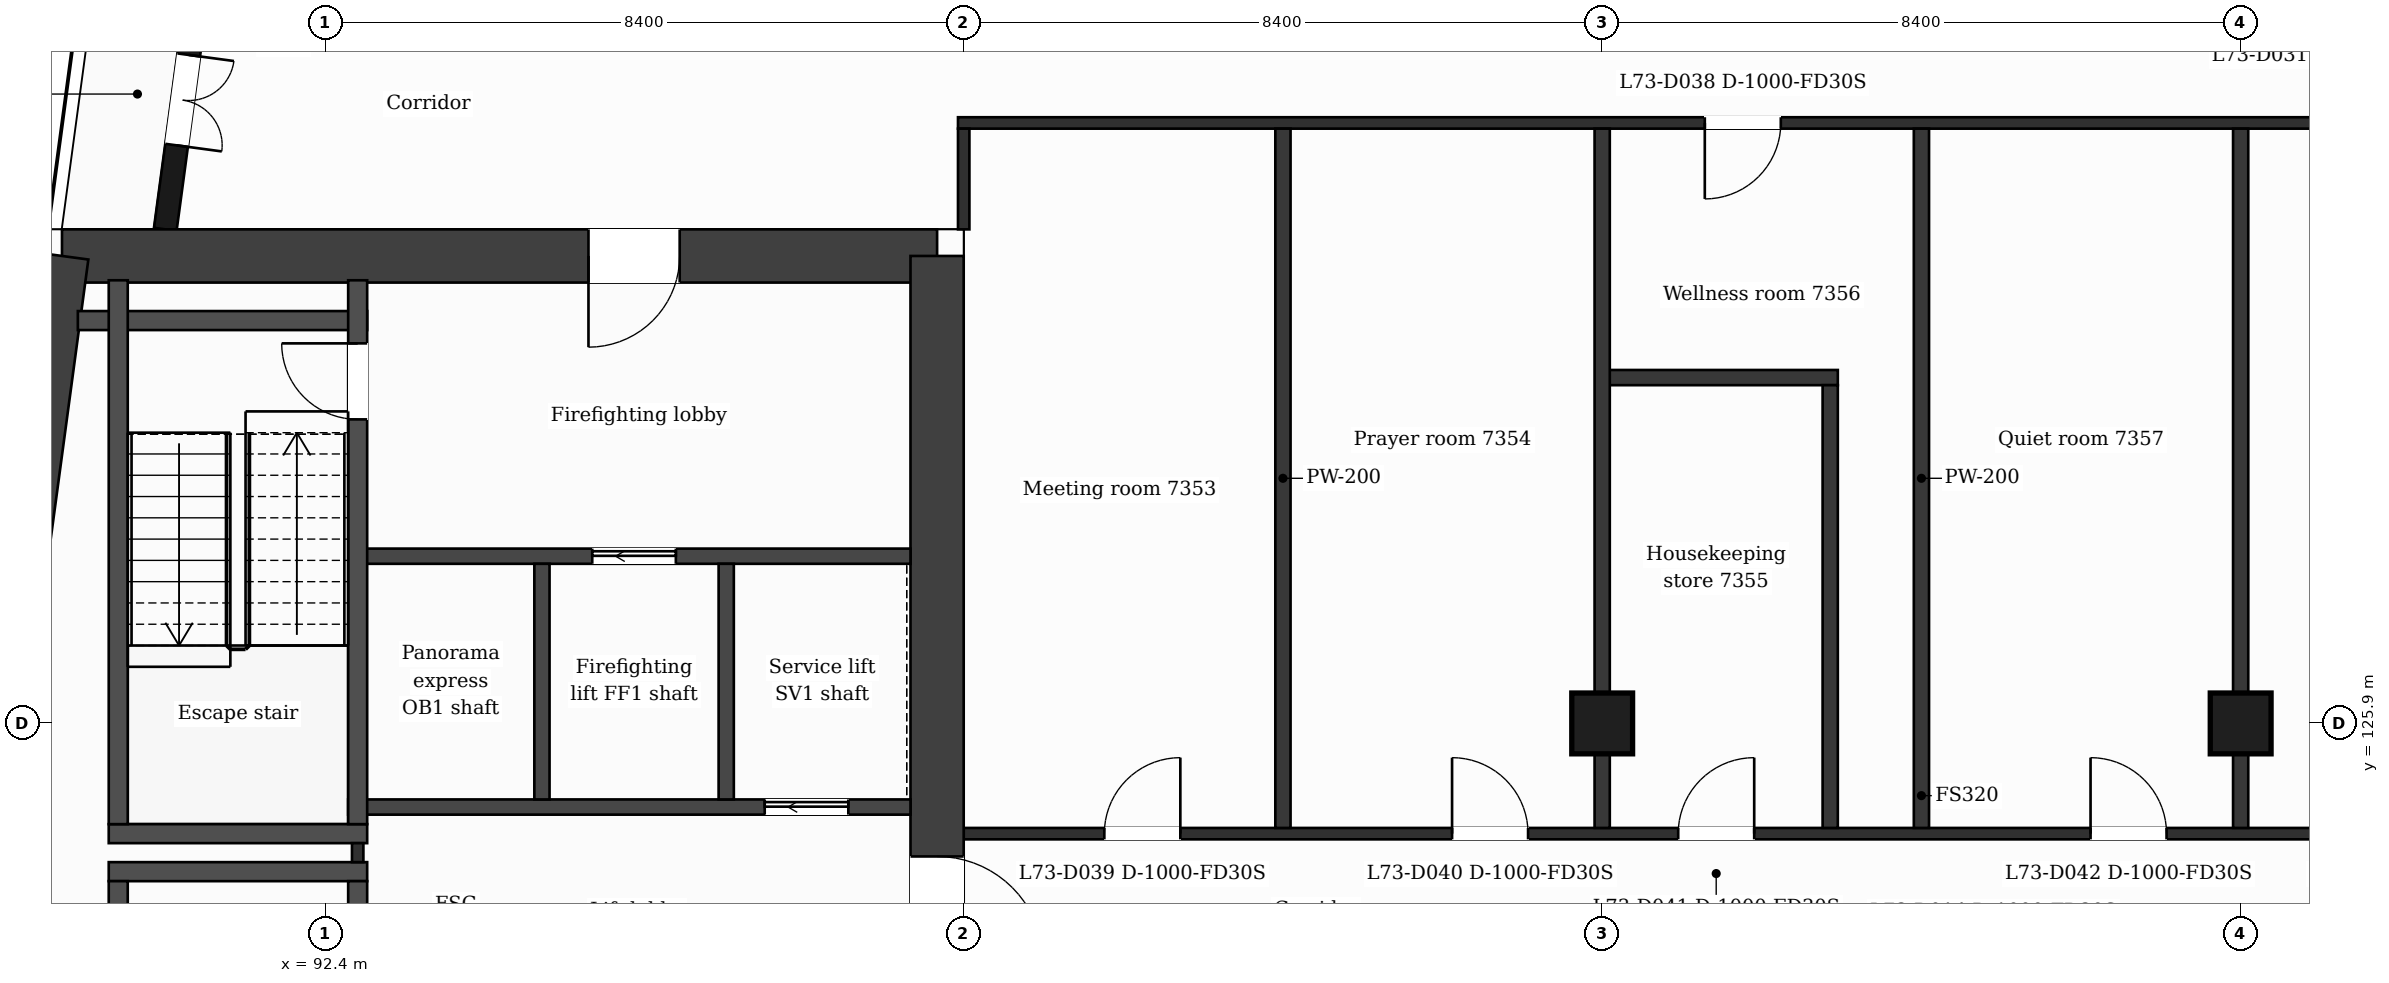
"""IFC4 building model, lengths in metres.
Left out: names, types, materials, properties, quantities, classifications, styles, units other than length and angle.
Written with IfcOpenShell. Run it as: python <this file> out.ifc"""

import sys

from ifc_helpers import new_model, si_unit, direction, frame, frame_2d, origin, origin_2d, place, context, subcontext, project, spatial, rectangle, extrude, element, fill, save


model = new_model("IFC4")
c1 = context("Model", 3, precision=1e-05, world=origin(), true_north=direction((0.0, 1.0)))
c2 = subcontext(c1, "Body", "Model", "MODEL_VIEW")
j1 = project(units=[si_unit("LENGTHUNIT", "METRE"), si_unit("PLANEANGLEUNIT", "RADIAN")], contexts=[c1])
p1 = place(None, origin())
s1 = spatial("IfcSite", under=j1, at=p1, CompositionType="ELEMENT")
p2 = place(p1, origin())
s2 = spatial("IfcBuilding", under=s1, at=p2, CompositionType="ELEMENT")
p3 = place(p2, frame((0.0, 0.0, 299.7)))
s3 = spatial("IfcBuildingStorey", under=s2, at=p3, CompositionType="ELEMENT", Elevation=299.7)
p4 = place(p3, frame((88.937, 132.05, 0.0), z_axis=(0.0, 0.0, 1.0), x_axis=(1.0, 0.0, 0.0)))
e1 = element("IfcWall", 1, at=p4, inside=s3, PredefinedType="SHEAR", context=c2, shape_type="SweptSolid", body=[
    extrude(rectangle(XDim=11.513, YDim=0.7, at=frame_2d((5.757, 0.0))), origin(), (0.0, 0.0, 1.0), 3.7),
])
p5 = place(p4, frame((6.927, 0.0, 0.0)))
e2 = element("IfcOpeningElement", 2, at=p5, cuts=e1, PredefinedType="OPENING", context=c2, shape_type="SweptSolid", body=[
    extrude(rectangle(XDim=1.2, YDim=2.1, at=frame_2d((0.6, 1.05))), frame((0.0, 0.36, 0.0), z_axis=(0.0, -1.0, 0.0), x_axis=(1.0, 0.0, 0.0)), (0.0, 0.0, 1.0), 0.72),
])
p6 = place(p3, frame((100.45, 132.05, 0.0), z_axis=(0.0, 0.0, 1.0), x_axis=(0.0, -1.0, 0.0)))
e3 = element("IfcWall", 3, at=p6, inside=s3, PredefinedType="SHEAR", context=c2, shape_type="SweptSolid", body=[
    extrude(rectangle(XDim=15.7, YDim=0.7, at=frame_2d((7.85, 0.0))), origin(), (0.0, 0.0, 1.0), 3.7),
])
p7 = place(p6, frame((7.9, 0.0, 0.0)))
e4 = element("IfcOpeningElement", 4, at=p7, cuts=e3, PredefinedType="OPENING", context=c2, shape_type="SweptSolid", body=[
    extrude(rectangle(XDim=1.4, YDim=2.1, at=frame_2d((0.7, 1.05))), frame((0.0, 0.36, 0.0), z_axis=(0.0, -1.0, 0.0), x_axis=(1.0, 0.0, 0.0)), (0.0, 0.0, 1.0), 0.72),
])
p8 = place(p3, frame((86.823, 116.35, 0.0), z_axis=(0.0, 0.0, 1.0), x_axis=(0.133416378607, 0.99106007382, 0.0)))
e5 = element("IfcWall", 5, at=p8, inside=s3, PredefinedType="SHEAR", context=c2, shape_type="SweptSolid", body=[
    extrude(rectangle(XDim=15.842, YDim=0.7, at=frame_2d((7.921, 0.0))), origin(), (0.0, 0.0, 1.0), 3.7),
])
for number, where, z_axis, x_axis in (
    (6, (109.2, 125.9, 0.0), (0.0, 0.0, 1.0), (1.0, 0.0, 0.0)),
    (7, (117.6, 125.9, 0.0), (0.0, 0.0, 1.0), (1.0, 0.0, 0.0)),
):
    element("IfcColumn", number, at=place(p3, frame(where, z_axis=z_axis, x_axis=x_axis)), inside=s3, PredefinedType="COLUMN", context=c2, shape_type="SweptSolid", body=[
        extrude(rectangle(XDim=0.8, YDim=0.8, at=origin_2d()), origin(), (0.0, 0.0, 1.0), 3.7),
    ])
p9 = place(p3, frame((91.177, 138.95, 0.0), z_axis=(0.0, 0.0, 1.0), x_axis=(-0.133426664613, -0.991058689065, 0.0)))
e8 = element("IfcWall", 8, at=p9, inside=s3, PredefinedType="SOLIDWALL", context=c2, shape_type="SweptSolid", body=[
    extrude(rectangle(XDim=6.609, YDim=0.3, at=frame_2d((3.305, 0.0))), origin(), (0.0, 0.0, 1.0), 3.25),
])
p10 = place(p9, frame((1.039, 0.0, 0.9)))
e9 = element("IfcOpeningElement", 9, at=p10, cuts=e8, PredefinedType="OPENING", context=c2, shape_type="SweptSolid", body=[
    extrude(rectangle(XDim=1.2, YDim=2.1, at=frame_2d((0.6, 1.05))), frame((0.0, 0.16, 0.0), z_axis=(0.0, -1.0, 0.0), x_axis=(1.0, 0.0, 0.0)), (0.0, 0.0, 1.0), 0.32),
])
p11 = place(p9, frame((4.294, 0.0, 0.0)))
e10 = element("IfcOpeningElement", 10, at=p11, cuts=e8, PredefinedType="OPENING", context=c2, shape_type="SweptSolid", body=[
    extrude(rectangle(XDim=1.2, YDim=2.4, at=frame_2d((0.6, 1.2))), frame((0.0, 0.16, 0.0), z_axis=(0.0, -1.0, 0.0), x_axis=(1.0, 0.0, 0.0)), (0.0, 0.0, 1.0), 0.32),
])
for number, where, z_axis, x_axis in (
    (11, (89.552, 123.95, 0.0), (0.0, 0.0, 1.0), (1.0, 0.0, 0.0)),
    (12, (89.552, 124.45, 0.0), (0.0, 0.0, 1.0), (1.0, 0.0, 0.0)),
):
    element("IfcWall", number, at=place(p3, frame(where, z_axis=z_axis, x_axis=x_axis)), inside=s3, PredefinedType="PARTITIONING", context=c2, shape_type="SweptSolid", body=[
        extrude(rectangle(XDim=3.4, YDim=0.25, at=frame_2d((1.7, 0.0))), origin(), (0.0, 0.0, 1.0), 3.25),
    ])
p12 = place(p3, frame((100.8, 124.45, 0.0), z_axis=(0.0, 0.0, 1.0), x_axis=(1.0, 0.0, 0.0)))
e13 = element("IfcWall", 13, at=p12, inside=s3, PredefinedType="PARTITIONING", context=c2, shape_type="SweptSolid", body=[
    extrude(rectangle(XDim=25.2, YDim=0.15, at=frame_2d((12.6, 0.0))), origin(), (0.0, 0.0, 1.0), 3.25),
])
p13 = place(p12, frame((1.85, 0.0, 0.0)))
e14 = element("IfcOpeningElement", 14, at=p13, cuts=e13, PredefinedType="OPENING", context=c2, shape_type="SweptSolid", body=[
    extrude(rectangle(XDim=1.0, YDim=2.1, at=frame_2d((0.5, 1.05))), frame((0.0, 0.085, 0.0), z_axis=(0.0, -1.0, 0.0), x_axis=(1.0, 0.0, 0.0)), (0.0, 0.0, 1.0), 0.17),
])
p14 = place(p12, frame((6.425, 0.0, 0.0)))
e15 = element("IfcOpeningElement", 15, at=p14, cuts=e13, PredefinedType="OPENING", context=c2, shape_type="SweptSolid", body=[
    extrude(rectangle(XDim=1.0, YDim=2.1, at=frame_2d((0.5, 1.05))), frame((0.0, 0.085, 0.0), z_axis=(0.0, -1.0, 0.0), x_axis=(1.0, 0.0, 0.0)), (0.0, 0.0, 1.0), 0.17),
])
p15 = place(p12, frame((9.4, 0.0, 0.0)))
e16 = element("IfcOpeningElement", 16, at=p15, cuts=e13, PredefinedType="OPENING", context=c2, shape_type="SweptSolid", body=[
    extrude(rectangle(XDim=1.0, YDim=2.1, at=frame_2d((0.5, 1.05))), frame((0.0, 0.085, 0.0), z_axis=(0.0, -1.0, 0.0), x_axis=(1.0, 0.0, 0.0)), (0.0, 0.0, 1.0), 0.17),
])
p16 = place(p12, frame((14.825, 0.0, 0.0)))
e17 = element("IfcOpeningElement", 17, at=p16, cuts=e13, PredefinedType="OPENING", context=c2, shape_type="SweptSolid", body=[
    extrude(rectangle(XDim=1.0, YDim=2.1, at=frame_2d((0.5, 1.05))), frame((0.0, 0.085, 0.0), z_axis=(0.0, -1.0, 0.0), x_axis=(1.0, 0.0, 0.0)), (0.0, 0.0, 1.0), 0.17),
])
p17 = place(p12, frame((18.825, 0.0, 0.0)))
e18 = element("IfcOpeningElement", 18, at=p17, cuts=e13, PredefinedType="OPENING", context=c2, shape_type="SweptSolid", body=[
    extrude(rectangle(XDim=1.0, YDim=2.1, at=frame_2d((0.5, 1.05))), frame((0.0, 0.085, 0.0), z_axis=(0.0, -1.0, 0.0), x_axis=(1.0, 0.0, 0.0)), (0.0, 0.0, 1.0), 0.17),
])
p18 = place(p3, frame((92.702, 124.8, 0.0), z_axis=(0.0, 0.0, 1.0), x_axis=(1.0, 0.0, 0.0)))
e19 = element("IfcWall", 19, at=p18, inside=s3, PredefinedType="PARTITIONING", context=c2, shape_type="SweptSolid", body=[
    extrude(rectangle(XDim=7.398, YDim=0.2, at=frame_2d((3.699, 0.0))), origin(), (0.0, 0.0, 1.0), 3.25),
])
p19 = place(p18, frame((5.48, 0.0, 0.0)))
e20 = element("IfcOpeningElement", 20, at=p19, cuts=e19, PredefinedType="OPENING", context=c2, shape_type="SweptSolid", body=[
    extrude(rectangle(XDim=1.1, YDim=2.1, at=frame_2d((0.55, 1.05))), frame((0.0, 0.11, 0.0), z_axis=(0.0, -1.0, 0.0), x_axis=(1.0, 0.0, 0.0)), (0.0, 0.0, 1.0), 0.22),
])
p20 = place(p3, frame((92.827, 128.1, 0.0), z_axis=(0.0, 0.0, 1.0), x_axis=(1.0, 0.0, 0.0)))
e21 = element("IfcWall", 21, at=p20, inside=s3, PredefinedType="PARTITIONING", context=c2, shape_type="SweptSolid", body=[
    extrude(rectangle(XDim=7.273, YDim=0.2, at=frame_2d((3.637, 0.0))), origin(), (0.0, 0.0, 1.0), 3.25),
])
p21 = place(p20, frame((3.086, 0.0, 0.0)))
e22 = element("IfcOpeningElement", 22, at=p21, cuts=e21, PredefinedType="OPENING", context=c2, shape_type="SweptSolid", body=[
    extrude(rectangle(XDim=1.1, YDim=2.1, at=frame_2d((0.55, 1.05))), frame((0.0, 0.11, 0.0), z_axis=(0.0, -1.0, 0.0), x_axis=(1.0, 0.0, 0.0)), (0.0, 0.0, 1.0), 0.22),
])
p22 = place(p3, frame((109.2, 130.45, 0.0), z_axis=(0.0, 0.0, 1.0), x_axis=(1.0, 0.0, 0.0)))
e23 = element("IfcWall", 23, at=p22, inside=s3, PredefinedType="PARTITIONING", context=c2, shape_type="SweptSolid", body=[
    extrude(rectangle(XDim=3.1, YDim=0.2, at=frame_2d((1.55, 0.0))), origin(), (0.0, 0.0, 1.0), 3.25),
])
p23 = place(p3, frame((89.146, 131.2, 0.0), z_axis=(0.0, 0.0, 1.0), x_axis=(1.0, 0.0, 0.0)))
e24 = element("IfcWall", 24, at=p23, inside=s3, PredefinedType="PARTITIONING", context=c2, shape_type="SweptSolid", body=[
    extrude(rectangle(XDim=3.806, YDim=0.25, at=frame_2d((1.903, 0.0))), origin(), (0.0, 0.0, 1.0), 3.25),
])
p24 = place(p3, frame((100.725, 133.8, 0.0), z_axis=(0.0, 0.0, 1.0), x_axis=(1.0, 0.0, 0.0)))
e25 = element("IfcWall", 25, at=p24, inside=s3, PredefinedType="PARTITIONING", context=c2, shape_type="SweptSolid", body=[
    extrude(rectangle(XDim=25.35, YDim=0.15, at=frame_2d((12.675, 0.0))), origin(), (0.0, 0.0, 1.0), 3.25),
])
p25 = place(p24, frame((9.825, 0.0, 0.0)))
e26 = element("IfcOpeningElement", 26, at=p25, cuts=e25, PredefinedType="OPENING", context=c2, shape_type="SweptSolid", body=[
    extrude(rectangle(XDim=1.0, YDim=2.1, at=frame_2d((0.5, 1.05))), frame((0.0, 0.085, 0.0), z_axis=(0.0, -1.0, 0.0), x_axis=(1.0, 0.0, 0.0)), (0.0, 0.0, 1.0), 0.17),
])
for number, where, z_axis, x_axis in (
    (27, (89.677, 116.67, 0.0), (0.0, 0.0, 1.0), (0.0, 1.0, 0.0)),
    (28, (89.677, 124.575, 0.0), (0.0, 0.0, 1.0), (0.0, 1.0, 0.0)),
):
    element("IfcWall", number, at=place(p3, frame(where, z_axis=z_axis, x_axis=x_axis)), inside=s3, PredefinedType="PARTITIONING", context=c2, shape_type="SweptSolid", body=[
        extrude(rectangle(XDim=7.155, YDim=0.25, at=frame_2d((3.578, 0.0))), origin(), (0.0, 0.0, 1.0), 3.25),
    ])
p26 = place(p3, frame((92.827, 124.075, 0.0), z_axis=(0.0, 0.0, 1.0), x_axis=(0.0, 1.0, 0.0)))
e29 = element("IfcWall", 29, at=p26, inside=s3, PredefinedType="PARTITIONING", context=c2, shape_type="SweptSolid", body=[
    extrude(rectangle(XDim=0.25, YDim=0.15, at=frame_2d((0.125, 0.0))), origin(), (0.0, 0.0, 1.0), 3.25),
])
p27 = place(p3, frame((92.827, 116.67, 0.0), z_axis=(0.0, 0.0, 1.0), x_axis=(0.0, 1.0, 0.0)))
e30 = element("IfcWall", 30, at=p27, inside=s3, PredefinedType="PARTITIONING", context=c2, shape_type="SweptSolid", body=[
    extrude(rectangle(XDim=7.155, YDim=0.25, at=frame_2d((3.578, 0.0))), origin(), (0.0, 0.0, 1.0), 3.25),
])
p28 = place(p27, frame((5.855, 0.0, 0.0)))
e31 = element("IfcOpeningElement", 31, at=p28, cuts=e30, PredefinedType="OPENING", context=c2, shape_type="SweptSolid", body=[
    extrude(rectangle(XDim=0.95, YDim=2.1, at=frame_2d((0.475, 1.05))), frame((0.0, 0.135, 0.0), z_axis=(0.0, -1.0, 0.0), x_axis=(1.0, 0.0, 0.0)), (0.0, 0.0, 1.0), 0.27),
])
p29 = place(p3, frame((92.827, 124.575, 0.0), z_axis=(0.0, 0.0, 1.0), x_axis=(0.0, 1.0, 0.0)))
e32 = element("IfcWall", 32, at=p29, inside=s3, PredefinedType="PARTITIONING", context=c2, shape_type="SweptSolid", body=[
    extrude(rectangle(XDim=7.155, YDim=0.25, at=frame_2d((3.578, 0.0))), origin(), (0.0, 0.0, 1.0), 3.25),
])
p30 = place(p29, frame((5.325, 0.0, 0.0)))
e33 = element("IfcOpeningElement", 33, at=p30, cuts=e32, PredefinedType="OPENING", context=c2, shape_type="SweptSolid", body=[
    extrude(rectangle(XDim=1.0, YDim=2.1, at=frame_2d((0.5, 1.05))), frame((0.0, 0.135, 0.0), z_axis=(0.0, -1.0, 0.0), x_axis=(1.0, 0.0, 0.0)), (0.0, 0.0, 1.0), 0.27),
])
for number, where, z_axis, x_axis in (
    (34, (95.251, 124.9, 0.0), (0.0, 0.0, 1.0), (0.0, 1.0, 0.0)),
    (35, (97.676, 124.9, 0.0), (0.0, 0.0, 1.0), (0.0, 1.0, 0.0)),
):
    element("IfcWall", number, at=place(p3, frame(where, z_axis=z_axis, x_axis=x_axis)), inside=s3, PredefinedType="PARTITIONING", context=c2, shape_type="SweptSolid", body=[
        extrude(rectangle(XDim=3.1, YDim=0.2, at=frame_2d((1.55, 0.0))), origin(), (0.0, 0.0, 1.0), 3.25),
    ])
p31 = place(p3, frame((100.8, 132.4, 0.0), z_axis=(0.0, 0.0, 1.0), x_axis=(0.0, 1.0, 0.0)))
e36 = element("IfcWall", 36, at=p31, inside=s3, PredefinedType="PARTITIONING", context=c2, shape_type="SweptSolid", body=[
    extrude(rectangle(XDim=1.325, YDim=0.15, at=frame_2d((0.663, 0.0))), origin(), (0.0, 0.0, 1.0), 3.25),
])
for number, where, z_axis, x_axis in (
    (37, (105.0, 124.525, 0.0), (0.0, 0.0, 1.0), (0.0, 1.0, 0.0)),
    (38, (109.2, 124.525, 0.0), (0.0, 0.0, 1.0), (0.0, 1.0, 0.0)),
):
    element("IfcWall", number, at=place(p3, frame(where, z_axis=z_axis, x_axis=x_axis)), inside=s3, PredefinedType="PARTITIONING", context=c2, shape_type="SweptSolid", body=[
        extrude(rectangle(XDim=9.2, YDim=0.2, at=frame_2d((4.6, 0.0))), origin(), (0.0, 0.0, 1.0), 3.25),
    ])
p32 = place(p3, frame((112.2, 124.525, 0.0), z_axis=(0.0, 0.0, 1.0), x_axis=(0.0, 1.0, 0.0)))
e39 = element("IfcWall", 39, at=p32, inside=s3, PredefinedType="PARTITIONING", context=c2, shape_type="SweptSolid", body=[
    extrude(rectangle(XDim=5.825, YDim=0.2, at=frame_2d((2.913, 0.0))), origin(), (0.0, 0.0, 1.0), 3.25),
])
for number, where, z_axis, x_axis in (
    (40, (113.4, 124.525, 0.0), (0.0, 0.0, 1.0), (0.0, 1.0, 0.0)),
    (41, (117.6, 124.525, 0.0), (0.0, 0.0, 1.0), (0.0, 1.0, 0.0)),
):
    element("IfcWall", number, at=place(p3, frame(where, z_axis=z_axis, x_axis=x_axis)), inside=s3, PredefinedType="PARTITIONING", context=c2, shape_type="SweptSolid", body=[
        extrude(rectangle(XDim=9.2, YDim=0.2, at=frame_2d((4.6, 0.0))), origin(), (0.0, 0.0, 1.0), 3.25),
    ])
p33 = place(p11, origin())
e42 = element("IfcDoor", 42, at=p33, inside=s3, OperationType="DOUBLE_DOOR_SINGLE_SWING", PredefinedType="DOOR", context=c2, shape_type="SweptSolid", body=[
    extrude(rectangle(XDim=1.2, YDim=2.4, at=frame_2d((0.6, 1.2))), frame((0.0, 0.025, 0.0), z_axis=(0.0, -1.0, 0.0), x_axis=(1.0, 0.0, 0.0)), (0.0, 0.0, 1.0), 0.05),
])
fill(e10, e42)
p34 = place(p21, origin())
e43 = element("IfcDoor", 43, at=p34, inside=s3, OperationType="SLIDING_TO_LEFT", PredefinedType="DOOR", context=c2, shape_type="SweptSolid", body=[
    extrude(rectangle(XDim=1.1, YDim=2.1, at=frame_2d((0.55, 1.05))), frame((0.0, 0.025, 0.0), z_axis=(0.0, -1.0, 0.0), x_axis=(1.0, 0.0, 0.0)), (0.0, 0.0, 1.0), 0.05),
])
fill(e22, e43)
p35 = place(p19, origin())
e44 = element("IfcDoor", 44, at=p35, inside=s3, OperationType="SLIDING_TO_LEFT", PredefinedType="DOOR", context=c2, shape_type="SweptSolid", body=[
    extrude(rectangle(XDim=1.1, YDim=2.1, at=frame_2d((0.55, 1.05))), frame((0.0, 0.025, 0.0), z_axis=(0.0, -1.0, 0.0), x_axis=(1.0, 0.0, 0.0)), (0.0, 0.0, 1.0), 0.05),
])
fill(e20, e44)
p36 = place(p30, origin())
e45 = element("IfcDoor", 45, at=p36, inside=s3, OperationType="SINGLE_SWING_RIGHT", PredefinedType="DOOR", context=c2, shape_type="SweptSolid", body=[
    extrude(rectangle(XDim=1.0, YDim=2.1, at=frame_2d((0.5, 1.05))), frame((0.0, 0.025, 0.0), z_axis=(0.0, -1.0, 0.0), x_axis=(1.0, 0.0, 0.0)), (0.0, 0.0, 1.0), 0.05),
])
fill(e33, e45)
p37 = place(p25, origin())
e46 = element("IfcDoor", 46, at=p37, inside=s3, OperationType="SINGLE_SWING_LEFT", PredefinedType="DOOR", context=c2, shape_type="SweptSolid", body=[
    extrude(rectangle(XDim=1.0, YDim=2.1, at=frame_2d((0.5, 1.05))), frame((0.0, 0.025, 0.0), z_axis=(0.0, -1.0, 0.0), x_axis=(1.0, 0.0, 0.0)), (0.0, 0.0, 1.0), 0.05),
])
fill(e26, e46)
p38 = place(p13, origin())
e47 = element("IfcDoor", 47, at=p38, inside=s3, OperationType="SINGLE_SWING_RIGHT", PredefinedType="DOOR", context=c2, shape_type="SweptSolid", body=[
    extrude(rectangle(XDim=1.0, YDim=2.1, at=frame_2d((0.5, 1.05))), frame((0.0, 0.025, 0.0), z_axis=(0.0, -1.0, 0.0), x_axis=(1.0, 0.0, 0.0)), (0.0, 0.0, 1.0), 0.05),
])
fill(e14, e47)
p39 = place(p14, origin())
e48 = element("IfcDoor", 48, at=p39, inside=s3, OperationType="SINGLE_SWING_LEFT", PredefinedType="DOOR", context=c2, shape_type="SweptSolid", body=[
    extrude(rectangle(XDim=1.0, YDim=2.1, at=frame_2d((0.5, 1.05))), frame((0.0, 0.025, 0.0), z_axis=(0.0, -1.0, 0.0), x_axis=(1.0, 0.0, 0.0)), (0.0, 0.0, 1.0), 0.05),
])
fill(e15, e48)
p40 = place(p15, origin())
e49 = element("IfcDoor", 49, at=p40, inside=s3, OperationType="SINGLE_SWING_RIGHT", PredefinedType="DOOR", context=c2, shape_type="SweptSolid", body=[
    extrude(rectangle(XDim=1.0, YDim=2.1, at=frame_2d((0.5, 1.05))), frame((0.0, 0.025, 0.0), z_axis=(0.0, -1.0, 0.0), x_axis=(1.0, 0.0, 0.0)), (0.0, 0.0, 1.0), 0.05),
])
fill(e16, e49)
p41 = place(p16, origin())
e50 = element("IfcDoor", 50, at=p41, inside=s3, OperationType="SINGLE_SWING_LEFT", PredefinedType="DOOR", context=c2, shape_type="SweptSolid", body=[
    extrude(rectangle(XDim=1.0, YDim=2.1, at=frame_2d((0.5, 1.05))), frame((0.0, 0.025, 0.0), z_axis=(0.0, -1.0, 0.0), x_axis=(1.0, 0.0, 0.0)), (0.0, 0.0, 1.0), 0.05),
])
fill(e17, e50)
p42 = place(p5, origin())
e51 = element("IfcDoor", 51, at=p42, inside=s3, OperationType="SINGLE_SWING_LEFT", PredefinedType="DOOR", context=c2, shape_type="SweptSolid", body=[
    extrude(rectangle(XDim=1.2, YDim=2.1, at=frame_2d((0.6, 1.05))), frame((0.0, 0.025, 0.0), z_axis=(0.0, -1.0, 0.0), x_axis=(1.0, 0.0, 0.0)), (0.0, 0.0, 1.0), 0.05),
])
fill(e2, e51)
p43 = place(p7, origin())
e52 = element("IfcDoor", 52, at=p43, inside=s3, OperationType="SINGLE_SWING_RIGHT", PredefinedType="DOOR", context=c2, shape_type="SweptSolid", body=[
    extrude(rectangle(XDim=1.4, YDim=2.1, at=frame_2d((0.7, 1.05))), frame((0.0, 0.025, 0.0), z_axis=(0.0, -1.0, 0.0), x_axis=(1.0, 0.0, 0.0)), (0.0, 0.0, 1.0), 0.05),
])
fill(e4, e52)
save(model, sys.argv[1])
